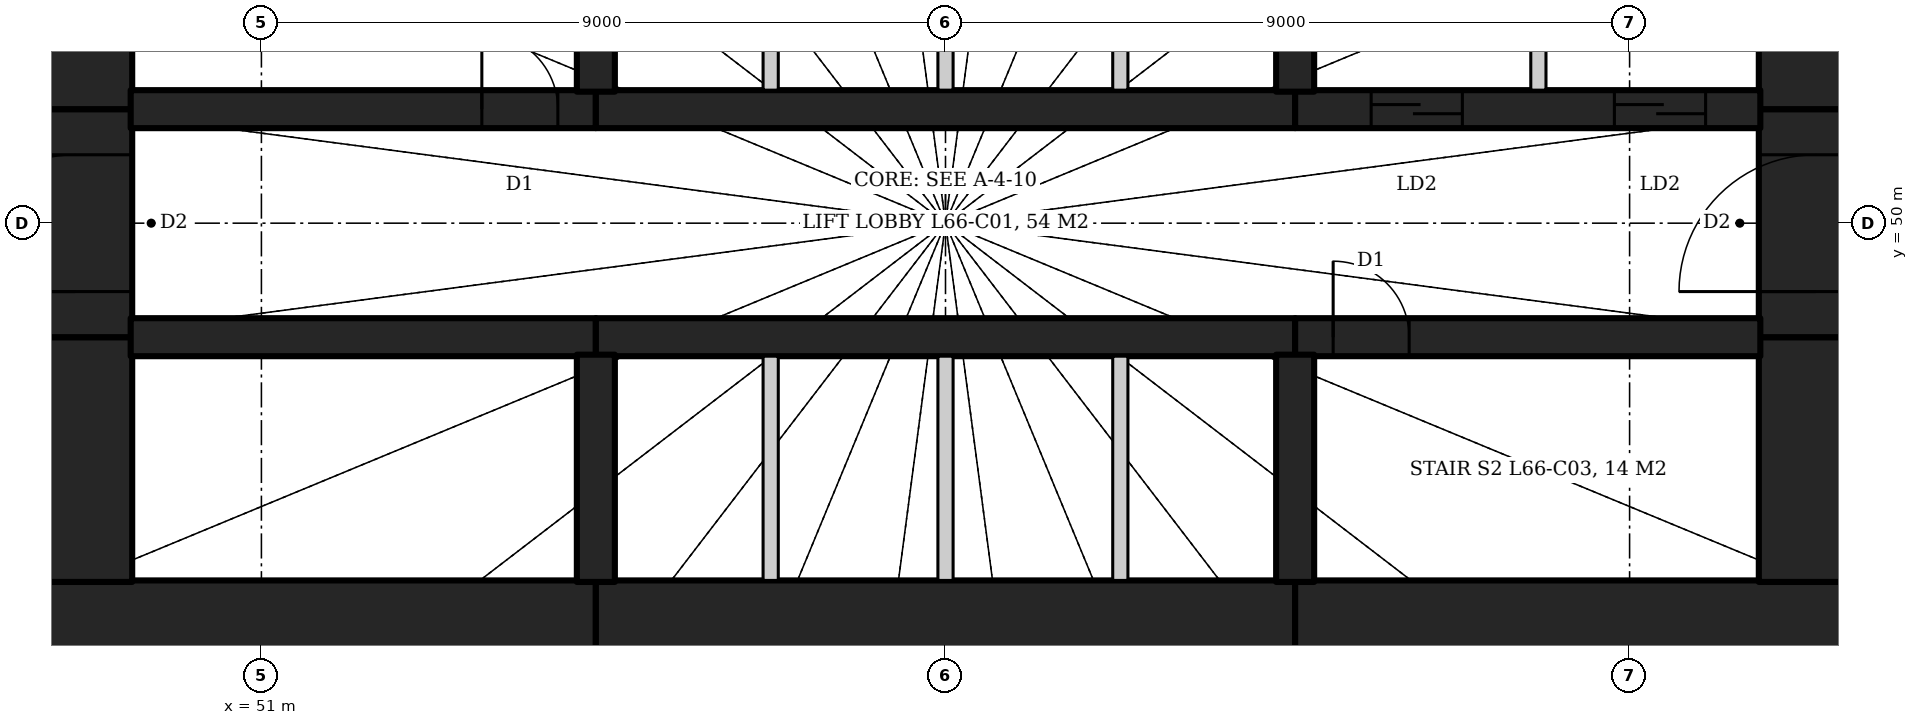
"""IFC4 building model, lengths in metres.
Left out: names, types, materials, properties, quantities, classifications, styles, units other than length and angle.
Written with IfcOpenShell. Run it as: python <this file> out.ifc"""

import sys

from ifc_helpers import new_model, si_unit, direction, frame, frame_2d, origin, place, context, subcontext, project, spatial, polyline, rectangle, outline, extrude, element, fill, save


model = new_model("IFC4")
c1 = context("Model", 3, precision=1e-05, world=origin(), true_north=direction((0.0, 1.0)))
c2 = subcontext(c1, "Body", "Model", "MODEL_VIEW")
j1 = project(units=[si_unit("LENGTHUNIT", "METRE"), si_unit("PLANEANGLEUNIT", "RADIAN")], contexts=[c1])
p1 = place(None, origin())
s1 = spatial("IfcSite", under=j1, at=p1, CompositionType="ELEMENT")
p2 = place(p1, origin())
s2 = spatial("IfcBuilding", under=s1, at=p2, CompositionType="ELEMENT")
p3 = place(p2, frame((0.0, 0.0, 286.4)))
s3 = spatial("IfcBuildingStorey", under=s2, at=p3, CompositionType="ELEMENT", Elevation=286.4)
p4 = place(p3, frame((47.8, 44.55, 0.0), z_axis=(0.0, 0.0, 1.0), x_axis=(1.0, 0.0, 0.0)))
e1 = element("IfcWall", 1, at=p4, inside=s3, PredefinedType="SHEAR", context=c2, shape_type="SweptSolid", body=[
    extrude(outline(polyline([(0.0, 0.0), (7.6, 0.0), (7.6, 9.475), (0.0, 9.475), (0.0, 0.0)])), frame((0.0, 0.75, 0.0), z_axis=(0.0, -1.0, 0.0), x_axis=(1.0, 0.0, 0.0)), (0.0, 0.0, 1.0), 1.5),
])
p5 = place(p3, frame((55.4, 44.55, 0.0), z_axis=(0.0, 0.0, 1.0), x_axis=(1.0, 0.0, 0.0)))
e2 = element("IfcWall", 2, at=p5, inside=s3, PredefinedType="SHEAR", context=c2, shape_type="SweptSolid", body=[
    extrude(outline(polyline([(0.0, 0.0), (9.2, 0.0), (9.2, 9.475), (0.0, 9.475), (0.0, 0.0)])), frame((0.0, 0.75, 0.0), z_axis=(0.0, -1.0, 0.0), x_axis=(1.0, 0.0, 0.0)), (0.0, 0.0, 1.0), 1.5),
])
p6 = place(p3, frame((64.6, 44.55, 0.0), z_axis=(0.0, 0.0, 1.0), x_axis=(1.0, 0.0, 0.0)))
e3 = element("IfcWall", 3, at=p6, inside=s3, PredefinedType="SHEAR", context=c2, shape_type="SweptSolid", body=[
    extrude(outline(polyline([(0.0, 0.0), (7.6, 0.0), (7.6, 9.475), (0.0, 9.475), (0.0, 0.0)])), frame((0.0, 0.75, 0.0), z_axis=(0.0, -1.0, 0.0), x_axis=(1.0, 0.0, 0.0)), (0.0, 0.0, 1.0), 1.5),
])
p7 = place(p3, frame((71.45, 45.28, 0.0), z_axis=(0.0, 0.0, 1.0), x_axis=(0.0, 1.0, 0.0)))
e4 = element("IfcWall", 4, at=p7, inside=s3, PredefinedType="SHEAR", context=c2, shape_type="SweptSolid", body=[
    extrude(outline(polyline([(0.0, 0.0), (3.22, 0.0), (3.22, 10.759), (0.0, 9.712), (0.0, 0.0)])), frame((0.0, 0.75, 0.0), z_axis=(0.0, -1.0, 0.0), x_axis=(1.0, 0.0, 0.0)), (0.0, 0.0, 1.0), 1.5),
])
p8 = place(p3, frame((71.45, 48.5, 0.0), z_axis=(0.0, 0.0, 1.0), x_axis=(0.0, 1.0, 0.0)))
e5 = element("IfcWall", 5, at=p8, inside=s3, PredefinedType="SHEAR", context=c2, shape_type="SweptSolid", body=[
    extrude(outline(polyline([(0.0, 0.0), (3.0, 0.0), (3.0, 11.733), (0.0, 10.759), (0.0, 0.0)])), frame((0.0, 0.75, 0.0), z_axis=(0.0, -1.0, 0.0), x_axis=(1.0, 0.0, 0.0)), (0.0, 0.0, 1.0), 1.5),
])
p9 = place(p8, frame((0.6, 0.0, 0.0)))
e6 = element("IfcOpeningElement", 6, at=p9, cuts=e5, PredefinedType="OPENING", context=c2, shape_type="SweptSolid", body=[
    extrude(rectangle(XDim=1.8, YDim=2.1, at=frame_2d((0.9, 1.05))), frame((0.0, 0.76, 0.0), z_axis=(0.0, -1.0, 0.0), x_axis=(1.0, 0.0, 0.0)), (0.0, 0.0, 1.0), 1.52),
])
p10 = place(p3, frame((71.45, 51.5, 0.0), z_axis=(0.0, 0.0, 1.0), x_axis=(0.0, 1.0, 0.0)))
e7 = element("IfcWall", 7, at=p10, inside=s3, PredefinedType="SHEAR", context=c2, shape_type="SweptSolid", body=[
    extrude(outline(polyline([(0.0, 0.0), (3.22, 0.0), (3.22, 12.78), (0.0, 11.733), (0.0, 0.0)])), frame((0.0, 0.75, 0.0), z_axis=(0.0, -1.0, 0.0), x_axis=(1.0, 0.0, 0.0)), (0.0, 0.0, 1.0), 1.5),
])
p11 = place(p3, frame((48.55, 45.28, 0.0), z_axis=(0.0, 0.0, 1.0), x_axis=(0.0, 1.0, 0.0)))
e8 = element("IfcWall", 8, at=p11, inside=s3, PredefinedType="SHEAR", context=c2, shape_type="SweptSolid", body=[
    extrude(outline(polyline([(0.0, 0.0), (3.22, 0.0), (3.22, 10.759), (0.0, 9.712), (0.0, 0.0)])), frame((0.0, 0.75, 0.0), z_axis=(0.0, -1.0, 0.0), x_axis=(1.0, 0.0, 0.0)), (0.0, 0.0, 1.0), 1.5),
])
p12 = place(p3, frame((48.55, 48.5, 0.0), z_axis=(0.0, 0.0, 1.0), x_axis=(0.0, 1.0, 0.0)))
e9 = element("IfcWall", 9, at=p12, inside=s3, PredefinedType="SHEAR", context=c2, shape_type="SweptSolid", body=[
    extrude(outline(polyline([(0.0, 0.0), (3.0, 0.0), (3.0, 11.733), (0.0, 10.759), (0.0, 0.0)])), frame((0.0, 0.75, 0.0), z_axis=(0.0, -1.0, 0.0), x_axis=(1.0, 0.0, 0.0)), (0.0, 0.0, 1.0), 1.5),
])
p13 = place(p12, frame((0.6, 0.0, 0.0)))
e10 = element("IfcOpeningElement", 10, at=p13, cuts=e9, PredefinedType="OPENING", context=c2, shape_type="SweptSolid", body=[
    extrude(rectangle(XDim=1.8, YDim=2.1, at=frame_2d((0.9, 1.05))), frame((0.0, 0.76, 0.0), z_axis=(0.0, -1.0, 0.0), x_axis=(1.0, 0.0, 0.0)), (0.0, 0.0, 1.0), 1.52),
])
p14 = place(p3, frame((48.55, 51.5, 0.0), z_axis=(0.0, 0.0, 1.0), x_axis=(0.0, 1.0, 0.0)))
e11 = element("IfcWall", 11, at=p14, inside=s3, PredefinedType="SHEAR", context=c2, shape_type="SweptSolid", body=[
    extrude(outline(polyline([(0.0, 0.0), (3.22, 0.0), (3.22, 12.78), (0.0, 11.733), (0.0, 0.0)])), frame((0.0, 0.75, 0.0), z_axis=(0.0, -1.0, 0.0), x_axis=(1.0, 0.0, 0.0)), (0.0, 0.0, 1.0), 1.5),
])
p15 = place(p3, frame((49.28, 51.5, 0.0), z_axis=(0.0, 0.0, 1.0), x_axis=(1.0, 0.0, 0.0)))
e12 = element("IfcWall", 12, at=p15, inside=s3, PredefinedType="SHEAR", context=c2, shape_type="SweptSolid", body=[
    extrude(outline(polyline([(0.0, 0.0), (6.12, 0.0), (6.12, 11.733), (0.0, 11.733), (0.0, 0.0)])), frame((0.0, 0.25, 0.0), z_axis=(0.0, -1.0, 0.0), x_axis=(1.0, 0.0, 0.0)), (0.0, 0.0, 1.0), 0.5),
])
p16 = place(p15, frame((4.62, 0.0, 0.0)))
e13 = element("IfcOpeningElement", 13, at=p16, cuts=e12, PredefinedType="OPENING", context=c2, shape_type="SweptSolid", body=[
    extrude(rectangle(XDim=1.0, YDim=2.1, at=frame_2d((0.5, 1.05))), frame((0.0, 0.26, 0.0), z_axis=(0.0, -1.0, 0.0), x_axis=(1.0, 0.0, 0.0)), (0.0, 0.0, 1.0), 0.52),
])
p17 = place(p3, frame((55.4, 51.5, 0.0), z_axis=(0.0, 0.0, 1.0), x_axis=(1.0, 0.0, 0.0)))
e14 = element("IfcWall", 14, at=p17, inside=s3, PredefinedType="SHEAR", context=c2, shape_type="SweptSolid", body=[
    extrude(outline(polyline([(0.0, 0.0), (9.2, 0.0), (9.2, 11.733), (0.0, 11.733), (0.0, 0.0)])), frame((0.0, 0.25, 0.0), z_axis=(0.0, -1.0, 0.0), x_axis=(1.0, 0.0, 0.0)), (0.0, 0.0, 1.0), 0.5),
])
p18 = place(p3, frame((64.6, 51.5, 0.0), z_axis=(0.0, 0.0, 1.0), x_axis=(1.0, 0.0, 0.0)))
e15 = element("IfcWall", 15, at=p18, inside=s3, PredefinedType="SHEAR", context=c2, shape_type="SweptSolid", body=[
    extrude(outline(polyline([(0.0, 0.0), (6.12, 0.0), (6.12, 11.733), (0.0, 11.733), (0.0, 0.0)])), frame((0.0, 0.25, 0.0), z_axis=(0.0, -1.0, 0.0), x_axis=(1.0, 0.0, 0.0)), (0.0, 0.0, 1.0), 0.5),
])
p19 = place(p18, frame((1.0, 0.0, 0.0)))
e16 = element("IfcOpeningElement", 16, at=p19, cuts=e15, PredefinedType="OPENING", context=c2, shape_type="SweptSolid", body=[
    extrude(rectangle(XDim=1.2, YDim=2.1, at=frame_2d((0.6, 1.05))), frame((0.0, 0.26, 0.0), z_axis=(0.0, -1.0, 0.0), x_axis=(1.0, 0.0, 0.0)), (0.0, 0.0, 1.0), 0.52),
])
p20 = place(p18, frame((4.2, 0.0, 0.0)))
e17 = element("IfcOpeningElement", 17, at=p20, cuts=e15, PredefinedType="OPENING", context=c2, shape_type="SweptSolid", body=[
    extrude(rectangle(XDim=1.2, YDim=2.1, at=frame_2d((0.6, 1.05))), frame((0.0, 0.26, 0.0), z_axis=(0.0, -1.0, 0.0), x_axis=(1.0, 0.0, 0.0)), (0.0, 0.0, 1.0), 0.52),
])
p21 = place(p3, frame((49.28, 48.5, 0.0), z_axis=(0.0, 0.0, 1.0), x_axis=(1.0, 0.0, 0.0)))
e18 = element("IfcWall", 18, at=p21, inside=s3, PredefinedType="SHEAR", context=c2, shape_type="SweptSolid", body=[
    extrude(outline(polyline([(0.0, 0.0), (6.12, 0.0), (6.12, 10.759), (0.0, 10.759), (0.0, 0.0)])), frame((0.0, 0.25, 0.0), z_axis=(0.0, -1.0, 0.0), x_axis=(1.0, 0.0, 0.0)), (0.0, 0.0, 1.0), 0.5),
])
p22 = place(p3, frame((55.4, 48.5, 0.0), z_axis=(0.0, 0.0, 1.0), x_axis=(1.0, 0.0, 0.0)))
e19 = element("IfcWall", 19, at=p22, inside=s3, PredefinedType="SHEAR", context=c2, shape_type="SweptSolid", body=[
    extrude(outline(polyline([(0.0, 0.0), (9.2, 0.0), (9.2, 10.759), (0.0, 10.759), (0.0, 0.0)])), frame((0.0, 0.25, 0.0), z_axis=(0.0, -1.0, 0.0), x_axis=(1.0, 0.0, 0.0)), (0.0, 0.0, 1.0), 0.5),
])
p23 = place(p3, frame((64.6, 48.5, 0.0), z_axis=(0.0, 0.0, 1.0), x_axis=(1.0, 0.0, 0.0)))
e20 = element("IfcWall", 20, at=p23, inside=s3, PredefinedType="SHEAR", context=c2, shape_type="SweptSolid", body=[
    extrude(outline(polyline([(0.0, 0.0), (6.12, 0.0), (6.12, 10.759), (0.0, 10.759), (0.0, 0.0)])), frame((0.0, 0.25, 0.0), z_axis=(0.0, -1.0, 0.0), x_axis=(1.0, 0.0, 0.0)), (0.0, 0.0, 1.0), 0.5),
])
p24 = place(p23, frame((0.5, 0.0, 0.0)))
e21 = element("IfcOpeningElement", 21, at=p24, cuts=e20, PredefinedType="OPENING", context=c2, shape_type="SweptSolid", body=[
    extrude(rectangle(XDim=1.0, YDim=2.1, at=frame_2d((0.5, 1.05))), frame((0.0, 0.26, 0.0), z_axis=(0.0, -1.0, 0.0), x_axis=(1.0, 0.0, 0.0)), (0.0, 0.0, 1.0), 0.52),
])
for number, where, z_axis, x_axis in (
    (22, (55.4, 51.73, 0.0), (0.0, 0.0, 1.0), (0.0, 1.0, 0.0)),
    (23, (64.6, 51.73, 0.0), (0.0, 0.0, 1.0), (0.0, 1.0, 0.0)),
):
    element("IfcWall", number, at=place(p3, frame(where, z_axis=z_axis, x_axis=x_axis)), inside=s3, PredefinedType="SHEAR", context=c2, shape_type="SweptSolid", body=[
        extrude(outline(polyline([(0.0, 0.0), (2.99, 0.0), (2.99, 12.78), (0.0, 11.808), (0.0, 0.0)])), frame((0.0, 0.25, 0.0), z_axis=(0.0, -1.0, 0.0), x_axis=(1.0, 0.0, 0.0)), (0.0, 0.0, 1.0), 0.5),
    ])
for number, where, z_axis, x_axis in (
    (24, (55.4, 48.27, 0.0), (0.0, 0.0, 1.0), (0.0, -1.0, 0.0)),
    (25, (64.6, 48.27, 0.0), (0.0, 0.0, 1.0), (0.0, -1.0, 0.0)),
):
    element("IfcWall", number, at=place(p3, frame(where, z_axis=z_axis, x_axis=x_axis)), inside=s3, PredefinedType="SHEAR", context=c2, shape_type="SweptSolid", body=[
        extrude(outline(polyline([(0.0, 0.0), (2.99, 0.0), (2.99, 9.712), (0.0, 10.684), (0.0, 0.0)])), frame((0.0, 0.25, 0.0), z_axis=(0.0, -1.0, 0.0), x_axis=(1.0, 0.0, 0.0)), (0.0, 0.0, 1.0), 0.5),
    ])
for number, where, z_axis, x_axis in (
    (26, (57.7, 51.75, 0.0), (0.0, 0.0, 1.0), (0.0, 1.0, 0.0)),
    (27, (60.0, 51.75, 0.0), (0.0, 0.0, 1.0), (0.0, 1.0, 0.0)),
    (28, (62.3, 51.75, 0.0), (0.0, 0.0, 1.0), (0.0, 1.0, 0.0)),
):
    element("IfcWall", number, at=place(p3, frame(where, z_axis=z_axis, x_axis=x_axis)), inside=s3, PredefinedType="PARTITIONING", context=c2, shape_type="SweptSolid", body=[
        extrude(outline(polyline([(0.0, 0.0), (2.95, 0.0), (2.95, 12.773), (0.0, 11.815), (0.0, 0.0)])), frame((0.0, 0.1, 0.0), z_axis=(0.0, -1.0, 0.0), x_axis=(1.0, 0.0, 0.0)), (0.0, 0.0, 1.0), 0.2),
    ])
for number, where, z_axis, x_axis in (
    (29, (57.7, 45.3, 0.0), (0.0, 0.0, 1.0), (0.0, 1.0, 0.0)),
    (30, (60.0, 45.3, 0.0), (0.0, 0.0, 1.0), (0.0, 1.0, 0.0)),
    (31, (62.3, 45.3, 0.0), (0.0, 0.0, 1.0), (0.0, 1.0, 0.0)),
):
    element("IfcWall", number, at=place(p3, frame(where, z_axis=z_axis, x_axis=x_axis)), inside=s3, PredefinedType="PARTITIONING", context=c2, shape_type="SweptSolid", body=[
        extrude(outline(polyline([(0.0, 0.0), (2.95, 0.0), (2.95, 10.677), (0.0, 9.719), (0.0, 0.0)])), frame((0.0, 0.1, 0.0), z_axis=(0.0, -1.0, 0.0), x_axis=(1.0, 0.0, 0.0)), (0.0, 0.0, 1.0), 0.2),
    ])
p25 = place(p3, frame((67.8, 51.75, 0.0), z_axis=(0.0, 0.0, 1.0), x_axis=(0.0, 1.0, 0.0)))
e32 = element("IfcWall", 32, at=p25, inside=s3, PredefinedType="PARTITIONING", context=c2, shape_type="SweptSolid", body=[
    extrude(outline(polyline([(0.0, 0.0), (2.95, 0.0), (2.95, 12.773), (0.0, 11.815), (0.0, 0.0)])), frame((0.0, 0.1, 0.0), z_axis=(0.0, -1.0, 0.0), x_axis=(1.0, 0.0, 0.0)), (0.0, 0.0, 1.0), 0.2),
])
p26 = place(p16, origin())
e33 = element("IfcDoor", 33, at=p26, inside=s3, OperationType="SINGLE_SWING_LEFT", PredefinedType="DOOR", context=c2, shape_type="SweptSolid", body=[
    extrude(rectangle(XDim=1.0, YDim=2.1, at=frame_2d((0.5, 1.05))), frame((0.0, 0.025, 0.0), z_axis=(0.0, -1.0, 0.0), x_axis=(1.0, 0.0, 0.0)), (0.0, 0.0, 1.0), 0.05),
])
fill(e13, e33)
p27 = place(p24, origin())
e34 = element("IfcDoor", 34, at=p27, inside=s3, OperationType="SINGLE_SWING_LEFT", PredefinedType="DOOR", context=c2, shape_type="SweptSolid", body=[
    extrude(rectangle(XDim=1.0, YDim=2.1, at=frame_2d((0.5, 1.05))), frame((0.0, 0.025, 0.0), z_axis=(0.0, -1.0, 0.0), x_axis=(1.0, 0.0, 0.0)), (0.0, 0.0, 1.0), 0.05),
])
fill(e21, e34)
p28 = place(p19, origin())
e35 = element("IfcDoor", 35, at=p28, inside=s3, OperationType="SLIDING_TO_LEFT", PredefinedType="DOOR", context=c2, shape_type="SweptSolid", body=[
    extrude(rectangle(XDim=1.2, YDim=2.1, at=frame_2d((0.6, 1.05))), frame((0.0, 0.025, 0.0), z_axis=(0.0, -1.0, 0.0), x_axis=(1.0, 0.0, 0.0)), (0.0, 0.0, 1.0), 0.05),
])
fill(e16, e35)
p29 = place(p20, origin())
e36 = element("IfcDoor", 36, at=p29, inside=s3, OperationType="SLIDING_TO_LEFT", PredefinedType="DOOR", context=c2, shape_type="SweptSolid", body=[
    extrude(rectangle(XDim=1.2, YDim=2.1, at=frame_2d((0.6, 1.05))), frame((0.0, 0.025, 0.0), z_axis=(0.0, -1.0, 0.0), x_axis=(1.0, 0.0, 0.0)), (0.0, 0.0, 1.0), 0.05),
])
fill(e17, e36)
p30 = place(p9, origin())
e37 = element("IfcDoor", 37, at=p30, inside=s3, OperationType="DOUBLE_DOOR_DOUBLE_SWING", PredefinedType="DOOR", context=c2, shape_type="SweptSolid", body=[
    extrude(rectangle(XDim=1.8, YDim=2.1, at=frame_2d((0.9, 1.05))), frame((0.0, 0.025, 0.0), z_axis=(0.0, -1.0, 0.0), x_axis=(1.0, 0.0, 0.0)), (0.0, 0.0, 1.0), 0.05),
])
fill(e6, e37)
p31 = place(p13, origin())
e38 = element("IfcDoor", 38, at=p31, inside=s3, OperationType="DOUBLE_DOOR_DOUBLE_SWING", PredefinedType="DOOR", context=c2, shape_type="SweptSolid", body=[
    extrude(rectangle(XDim=1.8, YDim=2.1, at=frame_2d((0.9, 1.05))), frame((0.0, 0.025, 0.0), z_axis=(0.0, -1.0, 0.0), x_axis=(1.0, 0.0, 0.0)), (0.0, 0.0, 1.0), 0.05),
])
fill(e10, e38)
save(model, sys.argv[1])
